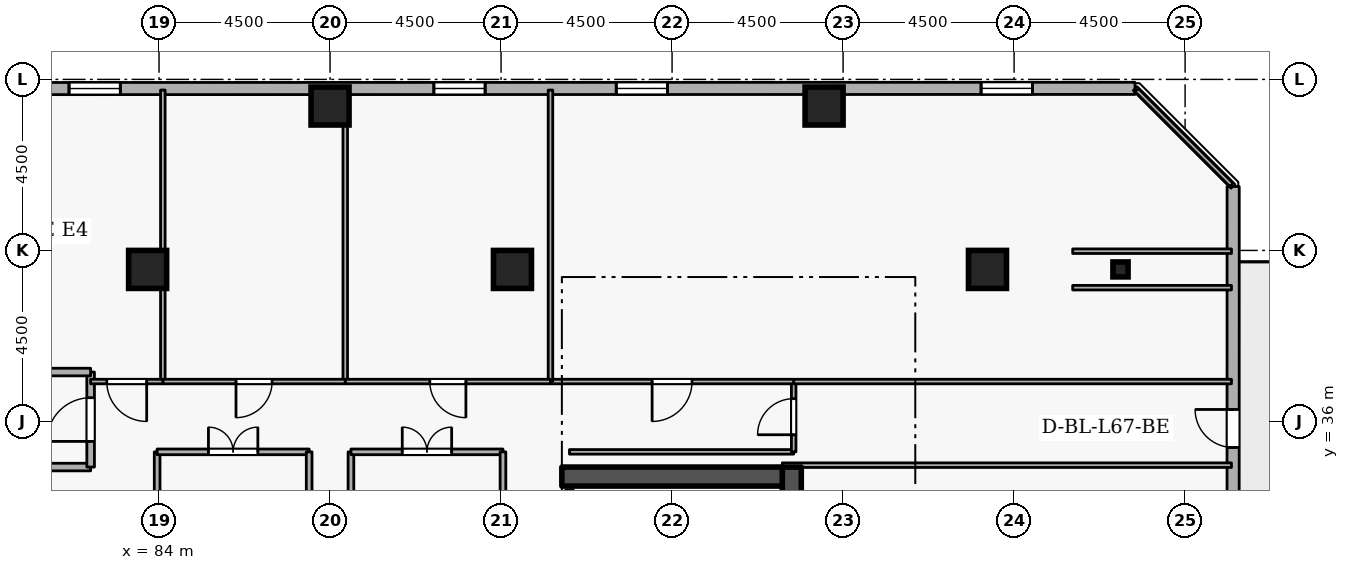
"""IFC4 building model, lengths in metres.
Left out: names, types, materials, properties, quantities, classifications, styles, units other than length and angle.
Written with IfcOpenShell. Run it as: python <this file> out.ifc"""

import sys

from ifc_helpers import new_model, si_unit, direction, frame, frame_2d, origin, origin_2d, place, context, subcontext, project, spatial, rectangle, i_section, extrude, element, fill, save


model = new_model("IFC4")
c1 = context("Model", 3, precision=1e-05, world=origin(), true_north=direction((0.0, 1.0)))
c2 = subcontext(c1, "Body", "Model", "MODEL_VIEW")
j1 = project(units=[si_unit("LENGTHUNIT", "METRE"), si_unit("PLANEANGLEUNIT", "RADIAN")], contexts=[c1])
p1 = place(None, origin())
s1 = spatial("IfcSite", under=j1, at=p1, CompositionType="ELEMENT")
p2 = place(p1, origin())
s2 = spatial("IfcBuilding", under=s1, at=p2, CompositionType="ELEMENT")
p3 = place(p2, frame((0.0, 0.0, 251.1)))
s3 = spatial("IfcBuildingStorey", under=s2, at=p3, CompositionType="ELEMENT", Elevation=251.1)
p4 = place(p3, frame((100.65, 19.2, 0.0), z_axis=(0.0, 0.0, 1.0), x_axis=(0.0, 1.0, 0.0)))
e1 = element("IfcWall", 1, at=p4, inside=s3, PredefinedType="SHEAR", context=c2, shape_type="SweptSolid", body=[
    extrude(rectangle(XDim=15.6, YDim=0.5, at=frame_2d((7.8, 0.0))), origin(), (0.0, 0.0, 1.0), 3.6),
])
p5 = place(p3, frame((94.6, 34.55, 0.0), z_axis=(0.0, 0.0, 1.0), x_axis=(1.0, 0.0, 0.0)))
e2 = element("IfcWall", 2, at=p5, inside=s3, PredefinedType="SHEAR", context=c2, shape_type="SweptSolid", body=[
    extrude(rectangle(XDim=5.8, YDim=0.5, at=frame_2d((2.9, 0.0))), origin(), (0.0, 0.0, 1.0), 3.6),
])
for number, where, z_axis, x_axis in (
    (3, (105.8, 40.0, 0.0), (0.0, 0.0, 1.0), (1.0, 0.0, 0.0)),
    (4, (101.5, 44.3, 0.0), (0.0, 0.0, 1.0), (1.0, 0.0, 0.0)),
    (5, (88.5, 44.3, 0.0), (0.0, 0.0, 1.0), (1.0, 0.0, 0.0)),
    (6, (93.3, 40.0, 0.0), (0.0, 0.0, 1.0), (1.0, 0.0, 0.0)),
    (7, (83.7, 40.0, 0.0), (0.0, 0.0, 1.0), (1.0, 0.0, 0.0)),
):
    element("IfcColumn", number, at=place(p3, frame(where, z_axis=z_axis, x_axis=x_axis)), inside=s3, PredefinedType="COLUMN", context=c2, shape_type="SweptSolid", body=[
        extrude(rectangle(XDim=1.0, YDim=1.0, at=origin_2d()), origin(), (0.0, 0.0, 1.0), 3.6),
    ])
p6 = place(p3, frame((109.3, 40.0, 0.0), z_axis=(0.0, 0.0, 1.0), x_axis=(1.0, 0.0, 0.0)))
e8 = element("IfcColumn", 8, at=p6, inside=s3, PredefinedType="COLUMN", context=c2, shape_type="SweptSolid", body=[
    extrude(i_section(OverallWidth=0.399, OverallDepth=0.394, WebThickness=0.023, FlangeThickness=0.037, FilletRadius=0.015, at=origin_2d()), origin(), (0.0, 0.0, 1.0), 3.6),
])
p7 = place(p3, frame((112.258, 7.749, 0.0), z_axis=(0.0, 0.0, 1.0), x_axis=(0.000184351399, 0.999999983007, 0.0)))
e9 = element("IfcWall", 9, at=p7, inside=s3, PredefinedType="STANDARD", context=c2, shape_type="SweptSolid", body=[
    extrude(rectangle(XDim=34.432, YDim=0.32, at=frame_2d((17.216, 0.0))), origin(), (0.0, 0.0, 1.0), 2.22),
])
p8 = place(p7, frame((27.566, 0.0, 0.0)))
e10 = element("IfcOpeningElement", 10, at=p8, cuts=e9, PredefinedType="OPENING", context=c2, shape_type="SweptSolid", body=[
    extrude(rectangle(XDim=1.0, YDim=2.08, at=frame_2d((0.5, 1.04))), frame((0.0, 0.17, 0.0), z_axis=(0.0, -1.0, 0.0), x_axis=(1.0, 0.0, 0.0)), (0.0, 0.0, 1.0), 0.34),
])
p9 = place(p7, frame((2.7, 0.0, 0.72)))
e11 = element("IfcOpeningElement", 11, at=p9, cuts=e9, PredefinedType="OPENING", context=c2, shape_type="SweptSolid", body=[
    extrude(rectangle(XDim=1.35, YDim=1.05, at=frame_2d((0.675, 0.525))), frame((0.0, 0.17, 0.0), z_axis=(0.0, -1.0, 0.0), x_axis=(1.0, 0.0, 0.0)), (0.0, 0.0, 1.0), 0.34),
])
p10 = place(p7, frame((12.3, 0.0, 0.72)))
e12 = element("IfcOpeningElement", 12, at=p10, cuts=e9, PredefinedType="OPENING", context=c2, shape_type="SweptSolid", body=[
    extrude(rectangle(XDim=1.35, YDim=1.05, at=frame_2d((0.675, 0.525))), frame((0.0, 0.17, 0.0), z_axis=(0.0, -1.0, 0.0), x_axis=(1.0, 0.0, 0.0)), (0.0, 0.0, 1.0), 0.34),
])
p11 = place(p7, frame((17.1, 0.0, 0.72)))
e13 = element("IfcOpeningElement", 13, at=p11, cuts=e9, PredefinedType="OPENING", context=c2, shape_type="SweptSolid", body=[
    extrude(rectangle(XDim=1.35, YDim=1.05, at=frame_2d((0.675, 0.525))), frame((0.0, 0.17, 0.0), z_axis=(0.0, -1.0, 0.0), x_axis=(1.0, 0.0, 0.0)), (0.0, 0.0, 1.0), 0.34),
])
p12 = place(p7, frame((21.9, 0.0, 0.72)))
e14 = element("IfcOpeningElement", 14, at=p12, cuts=e9, PredefinedType="OPENING", context=c2, shape_type="SweptSolid", body=[
    extrude(rectangle(XDim=1.35, YDim=1.05, at=frame_2d((0.675, 0.525))), frame((0.0, 0.17, 0.0), z_axis=(0.0, -1.0, 0.0), x_axis=(1.0, 0.0, 0.0)), (0.0, 0.0, 1.0), 0.34),
])
p13 = place(p3, frame((109.681, 44.765, 0.0), z_axis=(0.0, 0.0, 1.0), x_axis=(-0.999999983007, -0.000184351399, 0.0)))
e15 = element("IfcWall", 15, at=p13, inside=s3, PredefinedType="STANDARD", context=c2, shape_type="SweptSolid", body=[
    extrude(rectangle(XDim=34.432, YDim=0.32, at=frame_2d((17.216, 0.0))), origin(), (0.0, 0.0, 1.0), 2.22),
])
p14 = place(p13, frame((2.7, 0.0, 0.72)))
e16 = element("IfcOpeningElement", 16, at=p14, cuts=e15, PredefinedType="OPENING", context=c2, shape_type="SweptSolid", body=[
    extrude(rectangle(XDim=1.35, YDim=1.05, at=frame_2d((0.675, 0.525))), frame((0.0, 0.17, 0.0), z_axis=(0.0, -1.0, 0.0), x_axis=(1.0, 0.0, 0.0)), (0.0, 0.0, 1.0), 0.34),
])
p15 = place(p13, frame((12.3, 0.0, 0.72)))
e17 = element("IfcOpeningElement", 17, at=p15, cuts=e15, PredefinedType="OPENING", context=c2, shape_type="SweptSolid", body=[
    extrude(rectangle(XDim=1.35, YDim=1.05, at=frame_2d((0.675, 0.525))), frame((0.0, 0.17, 0.0), z_axis=(0.0, -1.0, 0.0), x_axis=(1.0, 0.0, 0.0)), (0.0, 0.0, 1.0), 0.34),
])
p16 = place(p13, frame((17.1, 0.0, 0.72)))
e18 = element("IfcOpeningElement", 18, at=p16, cuts=e15, PredefinedType="OPENING", context=c2, shape_type="SweptSolid", body=[
    extrude(rectangle(XDim=1.35, YDim=1.05, at=frame_2d((0.675, 0.525))), frame((0.0, 0.17, 0.0), z_axis=(0.0, -1.0, 0.0), x_axis=(1.0, 0.0, 0.0)), (0.0, 0.0, 1.0), 0.34),
])
p17 = place(p13, frame((26.7, 0.0, 0.72)))
e19 = element("IfcOpeningElement", 19, at=p17, cuts=e15, PredefinedType="OPENING", context=c2, shape_type="SweptSolid", body=[
    extrude(rectangle(XDim=1.35, YDim=1.05, at=frame_2d((0.675, 0.525))), frame((0.0, 0.17, 0.0), z_axis=(0.0, -1.0, 0.0), x_axis=(1.0, 0.0, 0.0)), (0.0, 0.0, 1.0), 0.34),
])
p18 = place(p3, frame((79.9, 34.8, 0.0), z_axis=(0.0, 0.0, 1.0), x_axis=(1.0, 0.0, 0.0)))
e20 = element("IfcWall", 20, at=p18, inside=s3, PredefinedType="STANDARD", context=c2, shape_type="SweptSolid", body=[
    extrude(rectangle(XDim=2.3, YDim=0.2, at=frame_2d((1.15, 0.0))), origin(), (0.0, 0.0, 1.0), 2.525),
])
p19 = place(p3, frame((82.2, 34.8, 0.0), z_axis=(0.0, 0.0, 1.0), x_axis=(0.0, 1.0, 0.0)))
e21 = element("IfcWall", 21, at=p19, inside=s3, PredefinedType="STANDARD", context=c2, shape_type="SweptSolid", body=[
    extrude(rectangle(XDim=2.5, YDim=0.2, at=frame_2d((1.25, 0.0))), origin(), (0.0, 0.0, 1.0), 3.32),
])
p20 = place(p19, frame((0.675, 0.0, 0.0)))
e22 = element("IfcOpeningElement", 22, at=p20, cuts=e21, PredefinedType="OPENING", context=c2, shape_type="SweptSolid", body=[
    extrude(rectangle(XDim=1.15, YDim=2.1, at=frame_2d((0.575, 1.05))), frame((0.0, 0.11, 0.0), z_axis=(0.0, -1.0, 0.0), x_axis=(1.0, 0.0, 0.0)), (0.0, 0.0, 1.0), 0.22),
])
p21 = place(p3, frame((82.2, 37.3, 0.0), z_axis=(0.0, 0.0, 1.0), x_axis=(-1.0, 0.0, 0.0)))
e23 = element("IfcWall", 23, at=p21, inside=s3, PredefinedType="STANDARD", context=c2, shape_type="SweptSolid", body=[
    extrude(rectangle(XDim=5.7, YDim=0.2, at=frame_2d((2.85, 0.0))), origin(), (0.0, 0.0, 1.0), 3.32),
])
p22 = place(p3, frame((94.8, 35.2, 0.0), z_axis=(0.0, 0.0, 1.0), x_axis=(1.0, 0.0, 0.0)))
e24 = element("IfcWall", 24, at=p22, inside=s3, PredefinedType="PARTITIONING", context=c2, shape_type="SweptSolid", body=[
    extrude(rectangle(XDim=5.9, YDim=0.12, at=frame_2d((2.95, 0.0))), origin(), (0.0, 0.0, 1.0), 3.32),
])
p23 = place(p3, frame((100.7, 35.2, 0.0), z_axis=(0.0, 0.0, 1.0), x_axis=(0.0, 1.0, 0.0)))
e25 = element("IfcWall", 25, at=p23, inside=s3, PredefinedType="PARTITIONING", context=c2, shape_type="SweptSolid", body=[
    extrude(rectangle(XDim=1.85, YDim=0.12, at=frame_2d((0.925, 0.0))), origin(), (0.0, 0.0, 1.0), 3.32),
])
p24 = place(p23, frame((0.45, 0.0, 0.0)))
e26 = element("IfcOpeningElement", 26, at=p24, cuts=e25, PredefinedType="OPENING", context=c2, shape_type="SweptSolid", body=[
    extrude(rectangle(XDim=0.95, YDim=2.1, at=frame_2d((0.475, 1.05))), frame((0.0, 0.07, 0.0), z_axis=(0.0, -1.0, 0.0), x_axis=(1.0, 0.0, 0.0)), (0.0, 0.0, 1.0), 0.14),
])
p25 = place(p3, frame((100.7, 37.05, 0.0), z_axis=(0.0, 0.0, 1.0), x_axis=(1.0, 0.0, 0.0)))
e27 = element("IfcWall", 27, at=p25, inside=s3, PredefinedType="PARTITIONING", context=c2, shape_type="SweptSolid", body=[
    extrude(rectangle(XDim=11.52, YDim=0.12, at=frame_2d((5.76, 0.0))), origin(), (0.0, 0.0, 1.0), 3.32),
])
p26 = place(p3, frame((112.22, 34.85, 0.0), z_axis=(0.0, 0.0, 1.0), x_axis=(-1.0, 0.0, 0.0)))
e28 = element("IfcWall", 28, at=p26, inside=s3, PredefinedType="PARTITIONING", context=c2, shape_type="SweptSolid", body=[
    extrude(rectangle(XDim=11.82, YDim=0.12, at=frame_2d((5.91, 0.0))), origin(), (0.0, 0.0, 1.0), 2.525),
])
p27 = place(p3, frame((100.7, 37.05, 0.0), z_axis=(0.0, 0.0, 1.0), x_axis=(-1.0, 0.0, 0.0)))
e29 = element("IfcWall", 29, at=p27, inside=s3, PredefinedType="PARTITIONING", context=c2, shape_type="SweptSolid", body=[
    extrude(rectangle(XDim=6.4, YDim=0.12, at=frame_2d((3.2, 0.0))), origin(), (0.0, 0.0, 1.0), 3.32),
])
p28 = place(p27, frame((2.675, 0.0, 0.0)))
e30 = element("IfcOpeningElement", 30, at=p28, cuts=e29, PredefinedType="OPENING", context=c2, shape_type="SweptSolid", body=[
    extrude(rectangle(XDim=1.05, YDim=2.1, at=frame_2d((0.525, 1.05))), frame((0.0, 0.07, 0.0), z_axis=(0.0, -1.0, 0.0), x_axis=(1.0, 0.0, 0.0)), (0.0, 0.0, 1.0), 0.14),
])
p29 = place(p3, frame((94.3, 37.05, 0.0), z_axis=(0.0, 0.0, 1.0), x_axis=(0.0, 1.0, 0.0)))
e31 = element("IfcWall", 31, at=p29, inside=s3, PredefinedType="PARTITIONING", context=c2, shape_type="SweptSolid", body=[
    extrude(rectangle(XDim=7.67, YDim=0.12, at=frame_2d((3.835, 0.0))), origin(), (0.0, 0.0, 1.0), 3.32),
])
p30 = place(p3, frame((109.725, 44.72, 0.0), z_axis=(0.0, 0.0, 1.0), x_axis=(0.707106781187, -0.707106781187, 0.0)))
e32 = element("IfcWall", 32, at=p30, inside=s3, PredefinedType="PARTITIONING", context=c2, shape_type="SweptSolid", body=[
    extrude(rectangle(XDim=3.528, YDim=0.12, at=frame_2d((1.764, 0.0))), origin(), (0.0, 0.0, 1.0), 3.32),
])
for number, where, z_axis, x_axis in (
    (33, (112.22, 40.48, 0.0), (0.0, 0.0, 1.0), (-1.0, 0.0, 0.0)),
    (34, (108.042, 39.52, 0.0), (0.0, 0.0, 1.0), (1.0, 0.0, 0.0)),
):
    element("IfcWall", number, at=place(p3, frame(where, z_axis=z_axis, x_axis=x_axis)), inside=s3, PredefinedType="PARTITIONING", context=c2, shape_type="SweptSolid", body=[
        extrude(rectangle(XDim=4.178, YDim=0.12, at=frame_2d((2.089, 0.0))), origin(), (0.0, 0.0, 1.0), 1.785),
    ])
p31 = place(p3, frame((88.9, 37.05, 0.0), z_axis=(0.0, 0.0, 1.0), x_axis=(0.0, 1.0, 0.0)))
e35 = element("IfcWall", 35, at=p31, inside=s3, PredefinedType="PARTITIONING", context=c2, shape_type="SweptSolid", body=[
    extrude(rectangle(XDim=7.67, YDim=0.12, at=frame_2d((3.835, 0.0))), origin(), (0.0, 0.0, 1.0), 1.785),
])
p32 = place(p3, frame((94.3, 37.05, 0.0), z_axis=(0.0, 0.0, 1.0), x_axis=(-1.0, 0.0, 0.0)))
e36 = element("IfcWall", 36, at=p32, inside=s3, PredefinedType="PARTITIONING", context=c2, shape_type="SweptSolid", body=[
    extrude(rectangle(XDim=5.4, YDim=0.12, at=frame_2d((2.7, 0.0))), origin(), (0.0, 0.0, 1.0), 3.32),
])
p33 = place(p32, frame((2.225, 0.0, 0.0)))
e37 = element("IfcOpeningElement", 37, at=p33, cuts=e36, PredefinedType="OPENING", context=c2, shape_type="SweptSolid", body=[
    extrude(rectangle(XDim=0.95, YDim=2.1, at=frame_2d((0.475, 1.05))), frame((0.0, 0.07, 0.0), z_axis=(0.0, -1.0, 0.0), x_axis=(1.0, 0.0, 0.0)), (0.0, 0.0, 1.0), 0.14),
])
p34 = place(p3, frame((84.1, 37.05, 0.0), z_axis=(0.0, 0.0, 1.0), x_axis=(0.0, 1.0, 0.0)))
e38 = element("IfcWall", 38, at=p34, inside=s3, PredefinedType="PARTITIONING", context=c2, shape_type="SweptSolid", body=[
    extrude(rectangle(XDim=7.67, YDim=0.12, at=frame_2d((3.835, 0.0))), origin(), (0.0, 0.0, 1.0), 3.32),
])
p35 = place(p3, frame((88.9, 37.05, 0.0), z_axis=(0.0, 0.0, 1.0), x_axis=(-1.0, 0.0, 0.0)))
e39 = element("IfcWall", 39, at=p35, inside=s3, PredefinedType="PARTITIONING", context=c2, shape_type="SweptSolid", body=[
    extrude(rectangle(XDim=4.8, YDim=0.12, at=frame_2d((2.4, 0.0))), origin(), (0.0, 0.0, 1.0), 3.32),
])
p36 = place(p35, frame((1.925, 0.0, 0.0)))
e40 = element("IfcOpeningElement", 40, at=p36, cuts=e39, PredefinedType="OPENING", context=c2, shape_type="SweptSolid", body=[
    extrude(rectangle(XDim=0.95, YDim=2.1, at=frame_2d((0.475, 1.05))), frame((0.0, 0.07, 0.0), z_axis=(0.0, -1.0, 0.0), x_axis=(1.0, 0.0, 0.0)), (0.0, 0.0, 1.0), 0.14),
])
p37 = place(p3, frame((84.1, 37.05, 0.0), z_axis=(0.0, 0.0, 1.0), x_axis=(-1.0, 0.0, 0.0)))
e41 = element("IfcWall", 41, at=p37, inside=s3, PredefinedType="PARTITIONING", context=c2, shape_type="SweptSolid", body=[
    extrude(rectangle(XDim=1.9, YDim=0.12, at=frame_2d((0.95, 0.0))), origin(), (0.0, 0.0, 1.0), 3.32),
])
p38 = place(p37, frame((0.425, 0.0, 0.0)))
e42 = element("IfcOpeningElement", 42, at=p38, cuts=e41, PredefinedType="OPENING", context=c2, shape_type="SweptSolid", body=[
    extrude(rectangle(XDim=1.05, YDim=2.1, at=frame_2d((0.525, 1.05))), frame((0.0, 0.07, 0.0), z_axis=(0.0, -1.0, 0.0), x_axis=(1.0, 0.0, 0.0)), (0.0, 0.0, 1.0), 0.14),
])
p39 = place(p3, frame((89.05, 32.2, 0.0), z_axis=(0.0, 0.0, 1.0), x_axis=(0.0, 1.0, 0.0)))
e43 = element("IfcWall", 43, at=p39, inside=s3, PredefinedType="PARTITIONING", context=c2, shape_type="SweptSolid", body=[
    extrude(rectangle(XDim=3.0, YDim=0.15, at=frame_2d((1.5, 0.0))), origin(), (0.0, 0.0, 1.0), 1.785),
])
p40 = place(p3, frame((89.05, 35.2, 0.0), z_axis=(0.0, 0.0, 1.0), x_axis=(1.0, 0.0, 0.0)))
e44 = element("IfcWall", 44, at=p40, inside=s3, PredefinedType="PARTITIONING", context=c2, shape_type="SweptSolid", body=[
    extrude(rectangle(XDim=4.0, YDim=0.15, at=frame_2d((2.0, 0.0))), origin(), (0.0, 0.0, 1.0), 3.32),
])
p41 = place(p40, frame((1.35, 0.0, 0.0)))
e45 = element("IfcOpeningElement", 45, at=p41, cuts=e44, PredefinedType="OPENING", context=c2, shape_type="SweptSolid", body=[
    extrude(rectangle(XDim=1.3, YDim=2.12, at=frame_2d((0.65, 1.06))), frame((0.0, 0.085, 0.0), z_axis=(0.0, -1.0, 0.0), x_axis=(1.0, 0.0, 0.0)), (0.0, 0.0, 1.0), 0.17),
])
for number, where, z_axis, x_axis in (
    (46, (93.05, 35.2, 0.0), (0.0, 0.0, 1.0), (0.0, -1.0, 0.0)),
    (47, (83.95, 32.2, 0.0), (0.0, 0.0, 1.0), (0.0, 1.0, 0.0)),
):
    element("IfcWall", number, at=place(p3, frame(where, z_axis=z_axis, x_axis=x_axis)), inside=s3, PredefinedType="PARTITIONING", context=c2, shape_type="SweptSolid", body=[
        extrude(rectangle(XDim=3.0, YDim=0.15, at=frame_2d((1.5, 0.0))), origin(), (0.0, 0.0, 1.0), 3.32),
    ])
p42 = place(p3, frame((83.95, 35.2, 0.0), z_axis=(0.0, 0.0, 1.0), x_axis=(1.0, 0.0, 0.0)))
e48 = element("IfcWall", 48, at=p42, inside=s3, PredefinedType="PARTITIONING", context=c2, shape_type="SweptSolid", body=[
    extrude(rectangle(XDim=4.0, YDim=0.15, at=frame_2d((2.0, 0.0))), origin(), (0.0, 0.0, 1.0), 3.32),
])
p43 = place(p42, frame((1.35, 0.0, 0.0)))
e49 = element("IfcOpeningElement", 49, at=p43, cuts=e48, PredefinedType="OPENING", context=c2, shape_type="SweptSolid", body=[
    extrude(rectangle(XDim=1.3, YDim=2.12, at=frame_2d((0.65, 1.06))), frame((0.0, 0.085, 0.0), z_axis=(0.0, -1.0, 0.0), x_axis=(1.0, 0.0, 0.0)), (0.0, 0.0, 1.0), 0.17),
])
p44 = place(p3, frame((87.95, 35.2, 0.0), z_axis=(0.0, 0.0, 1.0), x_axis=(0.0, -1.0, 0.0)))
e50 = element("IfcWall", 50, at=p44, inside=s3, PredefinedType="PARTITIONING", context=c2, shape_type="SweptSolid", body=[
    extrude(rectangle(XDim=3.0, YDim=0.15, at=frame_2d((1.5, 0.0))), origin(), (0.0, 0.0, 1.0), 1.785),
])
p45 = place(p8, origin())
e51 = element("IfcDoor", 51, at=p45, inside=s3, OperationType="SINGLE_SWING_RIGHT", PredefinedType="DOOR", context=c2, shape_type="SweptSolid", body=[
    extrude(rectangle(XDim=1.0, YDim=2.08, at=frame_2d((0.5, 1.04))), frame((0.0, 0.025, 0.0), z_axis=(0.0, -1.0, 0.0), x_axis=(1.0, 0.0, 0.0)), (0.0, 0.0, 1.0), 0.05),
])
fill(e10, e51)
p46 = place(p14, origin())
e52 = element("IfcWindow", 52, at=p46, inside=s3, PartitioningType="SINGLE_PANEL", PredefinedType="WINDOW", context=c2, shape_type="SweptSolid", body=[
    extrude(rectangle(XDim=1.35, YDim=1.05, at=frame_2d((0.675, 0.525))), frame((0.0, 0.03, 0.0), z_axis=(0.0, -1.0, 0.0), x_axis=(1.0, 0.0, 0.0)), (0.0, 0.0, 1.0), 0.06),
])
fill(e16, e52)
p47 = place(p15, origin())
e53 = element("IfcWindow", 53, at=p47, inside=s3, PartitioningType="SINGLE_PANEL", PredefinedType="WINDOW", context=c2, shape_type="SweptSolid", body=[
    extrude(rectangle(XDim=1.35, YDim=1.05, at=frame_2d((0.675, 0.525))), frame((0.0, 0.03, 0.0), z_axis=(0.0, -1.0, 0.0), x_axis=(1.0, 0.0, 0.0)), (0.0, 0.0, 1.0), 0.06),
])
fill(e17, e53)
p48 = place(p16, origin())
e54 = element("IfcWindow", 54, at=p48, inside=s3, PartitioningType="SINGLE_PANEL", PredefinedType="WINDOW", context=c2, shape_type="SweptSolid", body=[
    extrude(rectangle(XDim=1.35, YDim=1.05, at=frame_2d((0.675, 0.525))), frame((0.0, 0.03, 0.0), z_axis=(0.0, -1.0, 0.0), x_axis=(1.0, 0.0, 0.0)), (0.0, 0.0, 1.0), 0.06),
])
fill(e18, e54)
p49 = place(p17, origin())
e55 = element("IfcWindow", 55, at=p49, inside=s3, PartitioningType="SINGLE_PANEL", PredefinedType="WINDOW", context=c2, shape_type="SweptSolid", body=[
    extrude(rectangle(XDim=1.35, YDim=1.05, at=frame_2d((0.675, 0.525))), frame((0.0, 0.03, 0.0), z_axis=(0.0, -1.0, 0.0), x_axis=(1.0, 0.0, 0.0)), (0.0, 0.0, 1.0), 0.06),
])
fill(e19, e55)
p50 = place(p20, origin())
e56 = element("IfcDoor", 56, at=p50, inside=s3, OperationType="SINGLE_SWING_LEFT", PredefinedType="DOOR", context=c2, shape_type="SweptSolid", body=[
    extrude(rectangle(XDim=1.15, YDim=2.1, at=frame_2d((0.575, 1.05))), frame((0.0, 0.025, 0.0), z_axis=(0.0, -1.0, 0.0), x_axis=(1.0, 0.0, 0.0)), (0.0, 0.0, 1.0), 0.05),
])
fill(e22, e56)
p51 = place(p24, origin())
e57 = element("IfcDoor", 57, at=p51, inside=s3, OperationType="SINGLE_SWING_LEFT", PredefinedType="DOOR", context=c2, shape_type="SweptSolid", body=[
    extrude(rectangle(XDim=0.95, YDim=2.1, at=frame_2d((0.475, 1.05))), frame((0.0, 0.025, 0.0), z_axis=(0.0, -1.0, 0.0), x_axis=(1.0, 0.0, 0.0)), (0.0, 0.0, 1.0), 0.05),
])
fill(e26, e57)
p52 = place(p28, origin())
e58 = element("IfcDoor", 58, at=p52, inside=s3, OperationType="SINGLE_SWING_RIGHT", PredefinedType="DOOR", context=c2, shape_type="SweptSolid", body=[
    extrude(rectangle(XDim=1.05, YDim=2.1, at=frame_2d((0.525, 1.05))), frame((0.0, 0.025, 0.0), z_axis=(0.0, -1.0, 0.0), x_axis=(1.0, 0.0, 0.0)), (0.0, 0.0, 1.0), 0.05),
])
fill(e30, e58)
p53 = place(p33, origin())
e59 = element("IfcDoor", 59, at=p53, inside=s3, OperationType="SINGLE_SWING_LEFT", PredefinedType="DOOR", context=c2, shape_type="SweptSolid", body=[
    extrude(rectangle(XDim=0.95, YDim=2.1, at=frame_2d((0.475, 1.05))), frame((0.0, 0.025, 0.0), z_axis=(0.0, -1.0, 0.0), x_axis=(1.0, 0.0, 0.0)), (0.0, 0.0, 1.0), 0.05),
])
fill(e37, e59)
p54 = place(p36, origin())
e60 = element("IfcDoor", 60, at=p54, inside=s3, OperationType="SINGLE_SWING_RIGHT", PredefinedType="DOOR", context=c2, shape_type="SweptSolid", body=[
    extrude(rectangle(XDim=0.95, YDim=2.1, at=frame_2d((0.475, 1.05))), frame((0.0, 0.025, 0.0), z_axis=(0.0, -1.0, 0.0), x_axis=(1.0, 0.0, 0.0)), (0.0, 0.0, 1.0), 0.05),
])
fill(e40, e60)
p55 = place(p38, origin())
e61 = element("IfcDoor", 61, at=p55, inside=s3, OperationType="SINGLE_SWING_LEFT", PredefinedType="DOOR", context=c2, shape_type="SweptSolid", body=[
    extrude(rectangle(XDim=1.05, YDim=2.1, at=frame_2d((0.525, 1.05))), frame((0.0, 0.025, 0.0), z_axis=(0.0, -1.0, 0.0), x_axis=(1.0, 0.0, 0.0)), (0.0, 0.0, 1.0), 0.05),
])
fill(e42, e61)
p56 = place(p41, origin())
e62 = element("IfcDoor", 62, at=p56, inside=s3, OperationType="DOUBLE_DOOR_SINGLE_SWING", PredefinedType="DOOR", context=c2, shape_type="SweptSolid", body=[
    extrude(rectangle(XDim=1.3, YDim=2.12, at=frame_2d((0.65, 1.06))), frame((0.0, 0.025, 0.0), z_axis=(0.0, -1.0, 0.0), x_axis=(1.0, 0.0, 0.0)), (0.0, 0.0, 1.0), 0.05),
])
fill(e45, e62)
p57 = place(p43, origin())
e63 = element("IfcDoor", 63, at=p57, inside=s3, OperationType="DOUBLE_DOOR_SINGLE_SWING", PredefinedType="DOOR", context=c2, shape_type="SweptSolid", body=[
    extrude(rectangle(XDim=1.3, YDim=2.12, at=frame_2d((0.65, 1.06))), frame((0.0, 0.025, 0.0), z_axis=(0.0, -1.0, 0.0), x_axis=(1.0, 0.0, 0.0)), (0.0, 0.0, 1.0), 0.05),
])
fill(e49, e63)
save(model, sys.argv[1])
